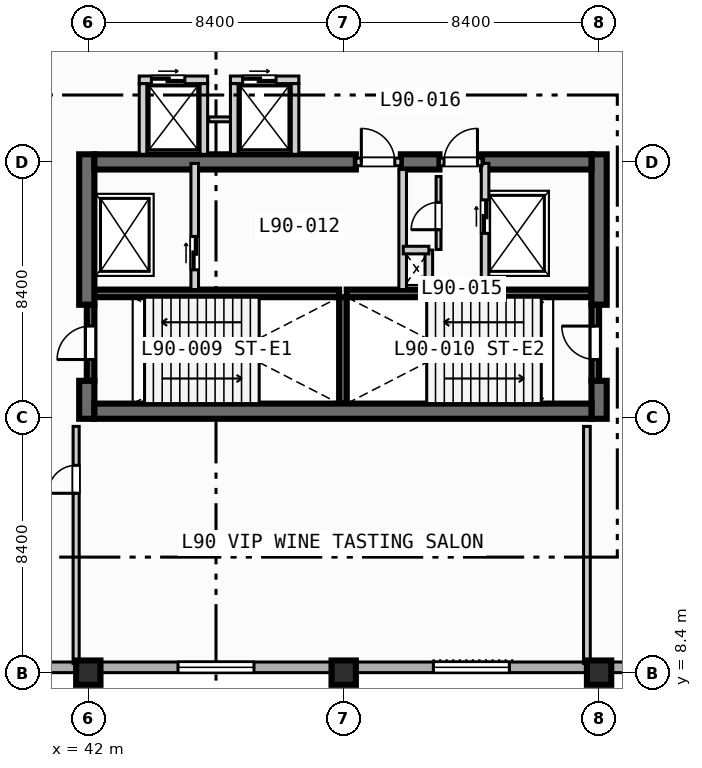
"""IFC4 building model, lengths in metres.
Left out: names, types, materials, properties, quantities, classifications, styles, units other than length and angle.
Written with IfcOpenShell. Run it as: python <this file> out.ifc"""

import sys

from ifc_helpers import new_model, si_unit, direction, frame, frame_2d, origin, origin_2d, place, context, subcontext, project, spatial, rectangle, extrude, element, fill, save


model = new_model("IFC4")
c1 = context("Model", 3, precision=1e-05, world=origin(), true_north=direction((0.0, 1.0)))
c2 = subcontext(c1, "Body", "Model", "MODEL_VIEW")
j1 = project(units=[si_unit("LENGTHUNIT", "METRE"), si_unit("PLANEANGLEUNIT", "RADIAN")], contexts=[c1])
p1 = place(None, origin())
s1 = spatial("IfcSite", under=j1, at=p1, CompositionType="ELEMENT")
p2 = place(p1, origin())
s2 = spatial("IfcBuilding", under=s1, at=p2, CompositionType="ELEMENT")
p3 = place(p2, frame((0.0, 0.0, 363.8)))
s3 = spatial("IfcBuildingStorey", under=s2, at=p3, CompositionType="ELEMENT", Elevation=363.8)
for number, where, z_axis, x_axis in (
    (1, (42.2, 20.875, 0.0), (0.0, 0.0, 1.0), (1.0, 0.0, 0.0)),
    (2, (50.5, 20.875, 0.0), (0.0, 0.0, 1.0), (1.0, 0.0, 0.0)),
):
    element("IfcWall", number, at=place(p3, frame(where, z_axis=z_axis, x_axis=x_axis)), inside=s3, PredefinedType="SOLIDWALL", context=c2, shape_type="SweptSolid", body=[
        extrude(rectangle(XDim=8.05, YDim=0.25, at=frame_2d((4.025, 0.0))), origin(), (0.0, 0.0, 1.0), 4.45),
    ])
p4 = place(p3, frame((50.375, 17.25, 0.0), z_axis=(0.0, 0.0, 1.0), x_axis=(0.0, 1.0, 0.0)))
e3 = element("IfcWall", 3, at=p4, inside=s3, PredefinedType="SOLIDWALL", context=c2, shape_type="SweptSolid", body=[
    extrude(rectangle(XDim=3.5, YDim=0.25, at=frame_2d((1.75, 0.0))), origin(), (0.0, 0.0, 1.0), 4.45),
])
p5 = place(p3, frame((41.95, 16.75, 0.0), z_axis=(0.0, 0.0, 1.0), x_axis=(0.0, 1.0, 0.0)))
e4 = element("IfcWall", 4, at=p5, inside=s3, PredefinedType="SHEAR", context=c2, shape_type="SweptSolid", body=[
    extrude(rectangle(XDim=1.25, YDim=0.5, at=frame_2d((0.625, 0.0))), origin(), (0.0, 0.0, 1.0), 4.45),
])
p6 = place(p3, frame((41.95, 20.5, 0.0), z_axis=(0.0, 0.0, 1.0), x_axis=(0.0, 1.0, 0.0)))
e5 = element("IfcWall", 5, at=p6, inside=s3, PredefinedType="SHEAR", context=c2, shape_type="SweptSolid", body=[
    extrude(rectangle(XDim=4.95, YDim=0.5, at=frame_2d((2.475, 0.0))), origin(), (0.0, 0.0, 1.0), 4.45),
])
p7 = place(p3, frame((58.8, 16.75, 0.0), z_axis=(0.0, 0.0, 1.0), x_axis=(0.0, 1.0, 0.0)))
e6 = element("IfcWall", 6, at=p7, inside=s3, PredefinedType="SHEAR", context=c2, shape_type="SweptSolid", body=[
    extrude(rectangle(XDim=1.25, YDim=0.5, at=frame_2d((0.625, 0.0))), origin(), (0.0, 0.0, 1.0), 4.45),
])
p8 = place(p3, frame((58.8, 20.5, 0.0), z_axis=(0.0, 0.0, 1.0), x_axis=(0.0, 1.0, 0.0)))
e7 = element("IfcWall", 7, at=p8, inside=s3, PredefinedType="SHEAR", context=c2, shape_type="SweptSolid", body=[
    extrude(rectangle(XDim=4.95, YDim=0.5, at=frame_2d((2.475, 0.0))), origin(), (0.0, 0.0, 1.0), 4.45),
])
p9 = place(p3, frame((42.2, 17.0, 0.0), z_axis=(0.0, 0.0, 1.0), x_axis=(1.0, 0.0, 0.0)))
e8 = element("IfcWall", 8, at=p9, inside=s3, PredefinedType="SHEAR", context=c2, shape_type="SweptSolid", body=[
    extrude(rectangle(XDim=16.35, YDim=0.5, at=frame_2d((8.175, 0.0))), origin(), (0.0, 0.0, 1.0), 4.45),
])
p10 = place(p3, frame((42.2, 25.2, 0.0), z_axis=(0.0, 0.0, 1.0), x_axis=(1.0, 0.0, 0.0)))
e9 = element("IfcWall", 9, at=p10, inside=s3, PredefinedType="SHEAR", context=c2, shape_type="SweptSolid", body=[
    extrude(rectangle(XDim=8.6, YDim=0.5, at=frame_2d((4.3, 0.0))), origin(), (0.0, 0.0, 1.0), 4.45),
])
p11 = place(p3, frame((52.28, 25.2, 0.0), z_axis=(0.0, 0.0, 1.0), x_axis=(1.0, 0.0, 0.0)))
e10 = element("IfcWall", 10, at=p11, inside=s3, PredefinedType="SHEAR", context=c2, shape_type="SweptSolid", body=[
    extrude(rectangle(XDim=1.27, YDim=0.5, at=frame_2d((0.635, 0.0))), origin(), (0.0, 0.0, 1.0), 4.45),
])
p12 = place(p3, frame((54.95, 25.2, 0.0), z_axis=(0.0, 0.0, 1.0), x_axis=(1.0, 0.0, 0.0)))
e11 = element("IfcWall", 11, at=p12, inside=s3, PredefinedType="SHEAR", context=c2, shape_type="SweptSolid", body=[
    extrude(rectangle(XDim=3.6, YDim=0.5, at=frame_2d((1.8, 0.0))), origin(), (0.0, 0.0, 1.0), 4.45),
])
for number, where, z_axis, x_axis in (
    (12, (42.0, 8.4, 0.0), (0.0, 0.0, 1.0), (1.0, 0.0, 0.0)),
    (13, (50.4, 8.4, 0.0), (0.0, 0.0, 1.0), (1.0, 0.0, 0.0)),
    (14, (58.8, 8.4, 0.0), (0.0, 0.0, 1.0), (1.0, 0.0, 0.0)),
):
    element("IfcColumn", number, at=place(p3, frame(where, z_axis=z_axis, x_axis=x_axis)), inside=s3, PredefinedType="COLUMN", context=c2, shape_type="SweptSolid", body=[
        extrude(rectangle(XDim=0.8, YDim=0.8, at=origin_2d()), origin(), (0.0, 0.0, 1.0), 4.8),
    ])
p13 = place(p3, frame((71.625, 8.575, 0.0), z_axis=(0.0, 0.0, 1.0), x_axis=(-1.0, 0.0, 0.0)))
e15 = element("IfcWall", 15, at=p13, inside=s3, PredefinedType="STANDARD", context=c2, shape_type="SweptSolid", body=[
    extrude(rectangle(XDim=60.05, YDim=0.35, at=frame_2d((30.025, 0.0))), origin(), (0.0, 0.0, 1.0), 3.599),
])
p14 = place(p13, frame((24.175, 0.0, 0.85)))
e16 = element("IfcOpeningElement", 16, at=p14, cuts=e15, PredefinedType="OPENING", context=c2, shape_type="SweptSolid", body=[
    extrude(rectangle(XDim=2.5, YDim=2.2, at=frame_2d((1.25, 1.1))), frame((0.0, 0.185, 0.0), z_axis=(0.0, -1.0, 0.0), x_axis=(1.0, 0.0, 0.0)), (0.0, 0.0, 1.0), 0.37),
])
p15 = place(p13, frame((15.775, 0.0, 0.85)))
e17 = element("IfcOpeningElement", 17, at=p15, cuts=e15, PredefinedType="OPENING", context=c2, shape_type="SweptSolid", body=[
    extrude(rectangle(XDim=2.5, YDim=2.2, at=frame_2d((1.25, 1.1))), frame((0.0, 0.185, 0.0), z_axis=(0.0, -1.0, 0.0), x_axis=(1.0, 0.0, 0.0)), (0.0, 0.0, 1.0), 0.37),
])
p16 = place(p3, frame((42.075, 18.0, 0.0), z_axis=(0.0, 0.0, 1.0), x_axis=(0.0, 1.0, 0.0)))
e18 = element("IfcWall", 18, at=p16, inside=s3, PredefinedType="SOLIDWALL", context=c2, shape_type="SweptSolid", body=[
    extrude(rectangle(XDim=2.5, YDim=0.25, at=frame_2d((1.25, 0.0))), origin(), (0.0, 0.0, 1.0), 4.45),
])
p17 = place(p16, frame((0.7, 0.0, 0.0)))
e19 = element("IfcOpeningElement", 19, at=p17, cuts=e18, PredefinedType="OPENING", context=c2, shape_type="SweptSolid", body=[
    extrude(rectangle(XDim=1.1, YDim=2.15, at=frame_2d((0.55, 1.075))), frame((0.0, 0.135, 0.0), z_axis=(0.0, -1.0, 0.0), x_axis=(1.0, 0.0, 0.0)), (0.0, 0.0, 1.0), 0.27),
])
p18 = place(p3, frame((58.675, 18.0, 0.0), z_axis=(0.0, 0.0, 1.0), x_axis=(0.0, 1.0, 0.0)))
e20 = element("IfcWall", 20, at=p18, inside=s3, PredefinedType="SOLIDWALL", context=c2, shape_type="SweptSolid", body=[
    extrude(rectangle(XDim=2.5, YDim=0.25, at=frame_2d((1.25, 0.0))), origin(), (0.0, 0.0, 1.0), 4.45),
])
p19 = place(p18, frame((0.7, 0.0, 0.0)))
e21 = element("IfcOpeningElement", 21, at=p19, cuts=e20, PredefinedType="OPENING", context=c2, shape_type="SweptSolid", body=[
    extrude(rectangle(XDim=1.1, YDim=2.15, at=frame_2d((0.55, 1.075))), frame((0.0, 0.135, 0.0), z_axis=(0.0, -1.0, 0.0), x_axis=(1.0, 0.0, 0.0)), (0.0, 0.0, 1.0), 0.27),
])
p20 = place(p3, frame((45.5, 21.0, 0.0), z_axis=(0.0, 0.0, 1.0), x_axis=(0.0, 1.0, 0.0)))
e22 = element("IfcWall", 22, at=p20, inside=s3, PredefinedType="SOLIDWALL", context=c2, shape_type="SweptSolid", body=[
    extrude(rectangle(XDim=4.15, YDim=0.25, at=frame_2d((2.075, 0.0))), origin(), (0.0, 0.0, 1.0), 4.45),
])
p21 = place(p20, frame((0.65, 0.0, 0.0)))
e23 = element("IfcOpeningElement", 23, at=p21, cuts=e22, PredefinedType="OPENING", context=c2, shape_type="SweptSolid", body=[
    extrude(rectangle(XDim=1.1, YDim=2.15, at=frame_2d((0.55, 1.075))), frame((0.0, 0.135, 0.0), z_axis=(0.0, -1.0, 0.0), x_axis=(1.0, 0.0, 0.0)), (0.0, 0.0, 1.0), 0.27),
])
p22 = place(p3, frame((50.8, 25.2, 0.0), z_axis=(0.0, 0.0, 1.0), x_axis=(1.0, 0.0, 0.0)))
e24 = element("IfcWall", 24, at=p22, inside=s3, PredefinedType="SOLIDWALL", context=c2, shape_type="SweptSolid", body=[
    extrude(rectangle(XDim=1.48, YDim=0.25, at=frame_2d((0.74, 0.0))), origin(), (0.0, 0.0, 1.0), 4.45),
])
p23 = place(p22, frame((0.18, 0.0, 0.0)))
e25 = element("IfcOpeningElement", 25, at=p23, cuts=e24, PredefinedType="OPENING", context=c2, shape_type="SweptSolid", body=[
    extrude(rectangle(XDim=1.1, YDim=2.15, at=frame_2d((0.55, 1.075))), frame((0.0, 0.135, 0.0), z_axis=(0.0, -1.0, 0.0), x_axis=(1.0, 0.0, 0.0)), (0.0, 0.0, 1.0), 0.27),
])
p24 = place(p3, frame((52.34, 21.0, 0.0), z_axis=(0.0, 0.0, 1.0), x_axis=(0.0, 1.0, 0.0)))
e26 = element("IfcWall", 26, at=p24, inside=s3, PredefinedType="SOLIDWALL", context=c2, shape_type="SweptSolid", body=[
    extrude(rectangle(XDim=3.95, YDim=0.25, at=frame_2d((1.975, 0.0))), origin(), (0.0, 0.0, 1.0), 4.45),
])
p25 = place(p3, frame((55.05, 21.0, 0.0), z_axis=(0.0, 0.0, 1.0), x_axis=(0.0, 1.0, 0.0)))
e27 = element("IfcWall", 27, at=p25, inside=s3, PredefinedType="SOLIDWALL", context=c2, shape_type="SweptSolid", body=[
    extrude(rectangle(XDim=4.15, YDim=0.25, at=frame_2d((2.075, 0.0))), origin(), (0.0, 0.0, 1.0), 4.45),
])
p26 = place(p25, frame((1.85, 0.0, 0.0)))
e28 = element("IfcOpeningElement", 28, at=p26, cuts=e27, PredefinedType="OPENING", context=c2, shape_type="SweptSolid", body=[
    extrude(rectangle(XDim=1.1, YDim=2.15, at=frame_2d((0.55, 1.075))), frame((0.0, 0.135, 0.0), z_axis=(0.0, -1.0, 0.0), x_axis=(1.0, 0.0, 0.0)), (0.0, 0.0, 1.0), 0.27),
])
p27 = place(p3, frame((53.55, 25.2, 0.0), z_axis=(0.0, 0.0, 1.0), x_axis=(1.0, 0.0, 0.0)))
e29 = element("IfcWall", 29, at=p27, inside=s3, PredefinedType="SOLIDWALL", context=c2, shape_type="SweptSolid", body=[
    extrude(rectangle(XDim=1.4, YDim=0.25, at=frame_2d((0.7, 0.0))), origin(), (0.0, 0.0, 1.0), 4.45),
])
p28 = place(p27, frame((0.15, 0.0, 0.0)))
e30 = element("IfcOpeningElement", 30, at=p28, cuts=e29, PredefinedType="OPENING", context=c2, shape_type="SweptSolid", body=[
    extrude(rectangle(XDim=1.1, YDim=2.15, at=frame_2d((0.55, 1.075))), frame((0.0, 0.135, 0.0), z_axis=(0.0, -1.0, 0.0), x_axis=(1.0, 0.0, 0.0)), (0.0, 0.0, 1.0), 0.27),
])
p29 = place(p3, frame((53.2, 21.0, 0.0), z_axis=(0.0, 0.0, 1.0), x_axis=(0.0, 1.0, 0.0)))
e31 = element("IfcWall", 31, at=p29, inside=s3, PredefinedType="SOLIDWALL", context=c2, shape_type="SweptSolid", body=[
    extrude(rectangle(XDim=1.3, YDim=0.25, at=frame_2d((0.65, 0.0))), origin(), (0.0, 0.0, 1.0), 4.45),
])
p30 = place(p3, frame((52.36, 22.3, 0.0), z_axis=(0.0, 0.0, 1.0), x_axis=(1.0, 0.0, 0.0)))
e32 = element("IfcWall", 32, at=p30, inside=s3, PredefinedType="SOLIDWALL", context=c2, shape_type="SweptSolid", body=[
    extrude(rectangle(XDim=0.84, YDim=0.25, at=frame_2d((0.42, 0.0))), origin(), (0.0, 0.0, 1.0), 4.45),
])
p31 = place(p3, frame((53.52, 22.32, 0.0), z_axis=(0.0, 0.0, 1.0), x_axis=(0.0, 1.0, 0.0)))
e33 = element("IfcWall", 33, at=p31, inside=s3, PredefinedType="PARTITIONING", context=c2, shape_type="SweptSolid", body=[
    extrude(rectangle(XDim=2.4, YDim=0.16, at=frame_2d((1.2, 0.0))), origin(), (0.0, 0.0, 1.0), 4.45),
])
p32 = place(p31, frame((0.65, 0.0, 0.0)))
e34 = element("IfcOpeningElement", 34, at=p32, cuts=e33, PredefinedType="OPENING", context=c2, shape_type="SweptSolid", body=[
    extrude(rectangle(XDim=0.9, YDim=2.1, at=frame_2d((0.45, 1.05))), frame((0.0, 0.09, 0.0), z_axis=(0.0, -1.0, 0.0), x_axis=(1.0, 0.0, 0.0)), (0.0, 0.0, 1.0), 0.18),
])
p33 = place(p3, frame((43.675, 27.9, 0.0), z_axis=(0.0, 0.0, 1.0), x_axis=(1.0, 0.0, 0.0)))
e35 = element("IfcWall", 35, at=p33, inside=s3, PredefinedType="SOLIDWALL", context=c2, shape_type="SweptSolid", body=[
    extrude(rectangle(XDim=2.25, YDim=0.25, at=frame_2d((1.125, 0.0))), origin(), (0.0, 0.0, 1.0), 4.45),
])
p34 = place(p33, frame((0.4, 0.0, 0.0)))
e36 = element("IfcOpeningElement", 36, at=p34, cuts=e35, PredefinedType="OPENING", context=c2, shape_type="SweptSolid", body=[
    extrude(rectangle(XDim=1.1, YDim=2.15, at=frame_2d((0.55, 1.075))), frame((0.0, 0.135, 0.0), z_axis=(0.0, -1.0, 0.0), x_axis=(1.0, 0.0, 0.0)), (0.0, 0.0, 1.0), 0.27),
])
for number, where, z_axis, x_axis in (
    (37, (43.8, 25.45, 0.0), (0.0, 0.0, 1.0), (0.0, 1.0, 0.0)),
    (38, (45.8, 25.45, 0.0), (0.0, 0.0, 1.0), (0.0, 1.0, 0.0)),
):
    element("IfcWall", number, at=place(p3, frame(where, z_axis=z_axis, x_axis=x_axis)), inside=s3, PredefinedType="SOLIDWALL", context=c2, shape_type="SweptSolid", body=[
        extrude(rectangle(XDim=2.325, YDim=0.25, at=frame_2d((1.163, 0.0))), origin(), (0.0, 0.0, 1.0), 4.45),
    ])
p35 = place(p3, frame((45.96, 26.6, 0.0), z_axis=(0.0, 0.0, 1.0), x_axis=(1.0, 0.0, 0.0)))
e39 = element("IfcWall", 39, at=p35, inside=s3, PredefinedType="PARTITIONING", context=c2, shape_type="SweptSolid", body=[
    extrude(rectangle(XDim=0.88, YDim=0.16, at=frame_2d((0.44, 0.0))), origin(), (0.0, 0.0, 1.0), 4.45),
])
p36 = place(p3, frame((46.675, 27.9, 0.0), z_axis=(0.0, 0.0, 1.0), x_axis=(1.0, 0.0, 0.0)))
e40 = element("IfcWall", 40, at=p36, inside=s3, PredefinedType="SOLIDWALL", context=c2, shape_type="SweptSolid", body=[
    extrude(rectangle(XDim=2.25, YDim=0.25, at=frame_2d((1.125, 0.0))), origin(), (0.0, 0.0, 1.0), 4.45),
])
p37 = place(p36, frame((0.4, 0.0, 0.0)))
e41 = element("IfcOpeningElement", 41, at=p37, cuts=e40, PredefinedType="OPENING", context=c2, shape_type="SweptSolid", body=[
    extrude(rectangle(XDim=1.1, YDim=2.15, at=frame_2d((0.55, 1.075))), frame((0.0, 0.135, 0.0), z_axis=(0.0, -1.0, 0.0), x_axis=(1.0, 0.0, 0.0)), (0.0, 0.0, 1.0), 0.27),
])
for number, where, z_axis, x_axis in (
    (42, (46.8, 25.45, 0.0), (0.0, 0.0, 1.0), (0.0, 1.0, 0.0)),
    (43, (48.8, 25.45, 0.0), (0.0, 0.0, 1.0), (0.0, 1.0, 0.0)),
):
    element("IfcWall", number, at=place(p3, frame(where, z_axis=z_axis, x_axis=x_axis)), inside=s3, PredefinedType="SOLIDWALL", context=c2, shape_type="SweptSolid", body=[
        extrude(rectangle(XDim=2.325, YDim=0.25, at=frame_2d((1.163, 0.0))), origin(), (0.0, 0.0, 1.0), 4.45),
    ])
p38 = place(p3, frame((41.6, 8.7, 0.0), z_axis=(0.0, 0.0, 1.0), x_axis=(0.0, 1.0, 0.0)))
e44 = element("IfcWall", 44, at=p38, inside=s3, PredefinedType="PARTITIONING", context=c2, shape_type="SweptSolid", body=[
    extrude(rectangle(XDim=7.8, YDim=0.2, at=frame_2d((3.9, 0.0))), origin(), (0.0, 0.0, 1.0), 4.45),
])
p39 = place(p38, frame((5.6, 0.0, 0.0)))
e45 = element("IfcOpeningElement", 45, at=p39, cuts=e44, PredefinedType="OPENING", context=c2, shape_type="SweptSolid", body=[
    extrude(rectangle(XDim=0.92, YDim=2.1, at=frame_2d((0.46, 1.05))), frame((0.0, 0.11, 0.0), z_axis=(0.0, -1.0, 0.0), x_axis=(1.0, 0.0, 0.0)), (0.0, 0.0, 1.0), 0.22),
])
p40 = place(p3, frame((58.4, 8.7, 0.0), z_axis=(0.0, 0.0, 1.0), x_axis=(0.0, 1.0, 0.0)))
e46 = element("IfcWall", 46, at=p40, inside=s3, PredefinedType="PARTITIONING", context=c2, shape_type="SweptSolid", body=[
    extrude(rectangle(XDim=7.8, YDim=0.22, at=frame_2d((3.9, 0.0))), origin(), (0.0, 0.0, 1.0), 4.45),
])
p41 = place(p14, origin())
e47 = element("IfcWindow", 47, at=p41, inside=s3, PartitioningType="SINGLE_PANEL", PredefinedType="WINDOW", context=c2, shape_type="SweptSolid", body=[
    extrude(rectangle(XDim=2.5, YDim=2.2, at=frame_2d((1.25, 1.1))), frame((0.0, 0.03, 0.0), z_axis=(0.0, -1.0, 0.0), x_axis=(1.0, 0.0, 0.0)), (0.0, 0.0, 1.0), 0.06),
])
fill(e16, e47)
p42 = place(p15, origin())
e48 = element("IfcWindow", 48, at=p42, inside=s3, PartitioningType="SINGLE_PANEL", PredefinedType="WINDOW", context=c2, shape_type="SweptSolid", body=[
    extrude(rectangle(XDim=2.5, YDim=2.2, at=frame_2d((1.25, 1.1))), frame((0.0, 0.03, 0.0), z_axis=(0.0, -1.0, 0.0), x_axis=(1.0, 0.0, 0.0)), (0.0, 0.0, 1.0), 0.06),
])
fill(e17, e48)
p43 = place(p17, origin())
e49 = element("IfcDoor", 49, at=p43, inside=s3, OperationType="SINGLE_SWING_LEFT", PredefinedType="DOOR", context=c2, shape_type="SweptSolid", body=[
    extrude(rectangle(XDim=1.1, YDim=2.15, at=frame_2d((0.55, 1.075))), frame((0.0, 0.025, 0.0), z_axis=(0.0, -1.0, 0.0), x_axis=(1.0, 0.0, 0.0)), (0.0, 0.0, 1.0), 0.05),
])
fill(e19, e49)
p44 = place(p19, origin())
e50 = element("IfcDoor", 50, at=p44, inside=s3, OperationType="SINGLE_SWING_RIGHT", PredefinedType="DOOR", context=c2, shape_type="SweptSolid", body=[
    extrude(rectangle(XDim=1.1, YDim=2.15, at=frame_2d((0.55, 1.075))), frame((0.0, 0.025, 0.0), z_axis=(0.0, -1.0, 0.0), x_axis=(1.0, 0.0, 0.0)), (0.0, 0.0, 1.0), 0.05),
])
fill(e21, e50)
p45 = place(p21, origin())
e51 = element("IfcDoor", 51, at=p45, inside=s3, OperationType="SLIDING_TO_LEFT", PredefinedType="DOOR", context=c2, shape_type="SweptSolid", body=[
    extrude(rectangle(XDim=1.1, YDim=2.15, at=frame_2d((0.55, 1.075))), frame((0.0, 0.025, 0.0), z_axis=(0.0, -1.0, 0.0), x_axis=(1.0, 0.0, 0.0)), (0.0, 0.0, 1.0), 0.05),
])
fill(e23, e51)
p46 = place(p23, origin())
e52 = element("IfcDoor", 52, at=p46, inside=s3, OperationType="SINGLE_SWING_LEFT", PredefinedType="DOOR", context=c2, shape_type="SweptSolid", body=[
    extrude(rectangle(XDim=1.1, YDim=2.15, at=frame_2d((0.55, 1.075))), frame((0.0, 0.025, 0.0), z_axis=(0.0, -1.0, 0.0), x_axis=(1.0, 0.0, 0.0)), (0.0, 0.0, 1.0), 0.05),
])
fill(e25, e52)
p47 = place(p26, origin())
e53 = element("IfcDoor", 53, at=p47, inside=s3, OperationType="SLIDING_TO_LEFT", PredefinedType="DOOR", context=c2, shape_type="SweptSolid", body=[
    extrude(rectangle(XDim=1.1, YDim=2.15, at=frame_2d((0.55, 1.075))), frame((0.0, 0.025, 0.0), z_axis=(0.0, -1.0, 0.0), x_axis=(1.0, 0.0, 0.0)), (0.0, 0.0, 1.0), 0.05),
])
fill(e28, e53)
p48 = place(p28, origin())
e54 = element("IfcDoor", 54, at=p48, inside=s3, OperationType="SINGLE_SWING_RIGHT", PredefinedType="DOOR", context=c2, shape_type="SweptSolid", body=[
    extrude(rectangle(XDim=1.1, YDim=2.15, at=frame_2d((0.55, 1.075))), frame((0.0, 0.025, 0.0), z_axis=(0.0, -1.0, 0.0), x_axis=(1.0, 0.0, 0.0)), (0.0, 0.0, 1.0), 0.05),
])
fill(e30, e54)
p49 = place(p32, origin())
e55 = element("IfcDoor", 55, at=p49, inside=s3, OperationType="SINGLE_SWING_LEFT", PredefinedType="DOOR", context=c2, shape_type="SweptSolid", body=[
    extrude(rectangle(XDim=0.9, YDim=2.1, at=frame_2d((0.45, 1.05))), frame((0.0, 0.025, 0.0), z_axis=(0.0, -1.0, 0.0), x_axis=(1.0, 0.0, 0.0)), (0.0, 0.0, 1.0), 0.05),
])
fill(e34, e55)
p50 = place(p34, origin())
e56 = element("IfcDoor", 56, at=p50, inside=s3, OperationType="SLIDING_TO_LEFT", PredefinedType="DOOR", context=c2, shape_type="SweptSolid", body=[
    extrude(rectangle(XDim=1.1, YDim=2.15, at=frame_2d((0.55, 1.075))), frame((0.0, 0.025, 0.0), z_axis=(0.0, -1.0, 0.0), x_axis=(1.0, 0.0, 0.0)), (0.0, 0.0, 1.0), 0.05),
])
fill(e36, e56)
p51 = place(p37, origin())
e57 = element("IfcDoor", 57, at=p51, inside=s3, OperationType="SLIDING_TO_LEFT", PredefinedType="DOOR", context=c2, shape_type="SweptSolid", body=[
    extrude(rectangle(XDim=1.1, YDim=2.15, at=frame_2d((0.55, 1.075))), frame((0.0, 0.025, 0.0), z_axis=(0.0, -1.0, 0.0), x_axis=(1.0, 0.0, 0.0)), (0.0, 0.0, 1.0), 0.05),
])
fill(e41, e57)
p52 = place(p39, origin())
e58 = element("IfcDoor", 58, at=p52, inside=s3, OperationType="SINGLE_SWING_LEFT", PredefinedType="DOOR", context=c2, shape_type="SweptSolid", body=[
    extrude(rectangle(XDim=0.92, YDim=2.1, at=frame_2d((0.46, 1.05))), frame((0.0, 0.025, 0.0), z_axis=(0.0, -1.0, 0.0), x_axis=(1.0, 0.0, 0.0)), (0.0, 0.0, 1.0), 0.05),
])
fill(e45, e58)
save(model, sys.argv[1])
